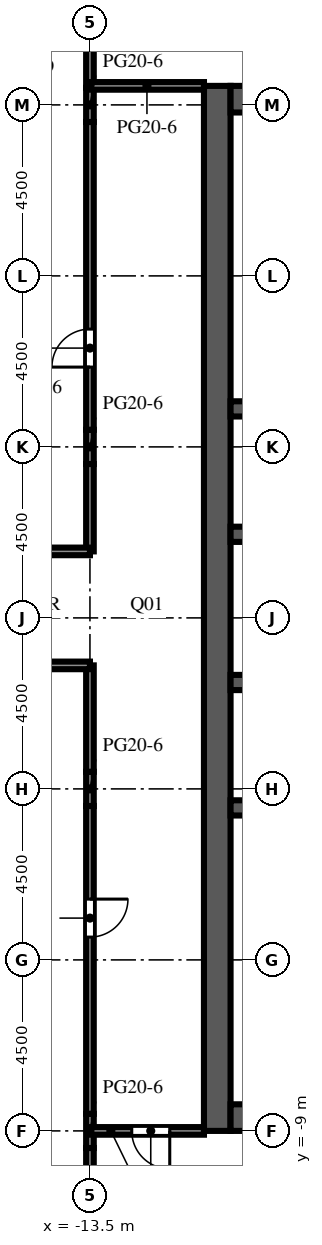
"""IFC4 building model, lengths in metres.
Left out: names, types, materials, properties, quantities, classifications, styles, units other than length and angle.
Written with IfcOpenShell. Run it as: python <this file> out.ifc"""

import sys

from ifc_helpers import new_model, si_unit, direction, frame, frame_2d, origin, place, context, subcontext, project, spatial, rectangle, extrude, element, fill, save


model = new_model("IFC4")
c1 = context("Model", 3, precision=1e-05, world=origin(), true_north=direction((0.0, 1.0)))
c2 = subcontext(c1, "Body", "Model", "MODEL_VIEW")
j1 = project(units=[si_unit("LENGTHUNIT", "METRE"), si_unit("PLANEANGLEUNIT", "RADIAN")], contexts=[c1])
p1 = place(None, origin())
s1 = spatial("IfcSite", under=j1, at=p1, CompositionType="ELEMENT")
p2 = place(p1, origin())
s2 = spatial("IfcBuilding", under=s1, at=p2, CompositionType="ELEMENT")
p3 = place(p2, frame((0.0, 0.0, 260.3)))
s3 = spatial("IfcBuildingStorey", under=s2, at=p3, CompositionType="ELEMENT", Elevation=260.3)
p4 = place(p3, frame((-10.15, -9.0, 0.0), z_axis=(0.0, 0.0, 1.0), x_axis=(0.0, 1.0, 0.0)))
e1 = element("IfcWall", 1, at=p4, inside=s3, PredefinedType="SHEAR", context=c2, shape_type="SweptSolid", body=[
    extrude(rectangle(XDim=27.5, YDim=0.7, at=frame_2d((13.75, 0.0))), origin(), (0.0, 0.0, 1.0), 6.0),
])
p5 = place(p4, frame((12.55, 0.0, 0.0)))
e2 = element("IfcOpeningElement", 2, at=p5, cuts=e1, PredefinedType="OPENING", context=c2, shape_type="SweptSolid", body=[
    extrude(rectangle(XDim=2.4, YDim=2.4, at=frame_2d((1.2, 1.2))), frame((0.0, 0.36, 0.0), z_axis=(0.0, -1.0, 0.0), x_axis=(1.0, 0.0, 0.0)), (0.0, 0.0, 1.0), 0.72),
])
p6 = place(p4, frame((6.825, 0.0, 0.0)))
e3 = element("IfcOpeningElement", 3, at=p6, cuts=e1, PredefinedType="OPENING", context=c2, shape_type="SweptSolid", body=[
    extrude(rectangle(XDim=1.2, YDim=2.1, at=frame_2d((0.6, 1.05))), frame((0.0, 0.36, 0.0), z_axis=(0.0, -1.0, 0.0), x_axis=(1.0, 0.0, 0.0)), (0.0, 0.0, 1.0), 0.72),
])
p7 = place(p4, frame((19.475, 0.0, 0.0)))
e4 = element("IfcOpeningElement", 4, at=p7, cuts=e1, PredefinedType="OPENING", context=c2, shape_type="SweptSolid", body=[
    extrude(rectangle(XDim=1.2, YDim=2.1, at=frame_2d((0.6, 1.05))), frame((0.0, 0.36, 0.0), z_axis=(0.0, -1.0, 0.0), x_axis=(1.0, 0.0, 0.0)), (0.0, 0.0, 1.0), 0.72),
])
for number, where, z_axis, x_axis in (
    (5, (-9.8, -8.65, 0.0), (0.0, 0.0, 1.0), (1.0, 0.0, 0.0)),
    (6, (-9.8, 18.15, 0.0), (0.0, 0.0, 1.0), (1.0, 0.0, 0.0)),
):
    element("IfcWall", number, at=place(p3, frame(where, z_axis=z_axis, x_axis=x_axis)), inside=s3, PredefinedType="SHEAR", context=c2, shape_type="SweptSolid", body=[
        extrude(rectangle(XDim=10.6, YDim=0.7, at=frame_2d((5.3, 0.0))), origin(), (0.0, 0.0, 1.0), 6.0),
    ])
p8 = place(p3, frame((-9.8, -0.5, 0.0), z_axis=(0.0, 0.0, 1.0), x_axis=(1.0, 0.0, 0.0)))
e7 = element("IfcWall", 7, at=p8, inside=s3, PredefinedType="SHEAR", context=c2, shape_type="SweptSolid", body=[
    extrude(rectangle(XDim=10.6, YDim=0.4, at=frame_2d((5.3, 0.0))), origin(), (0.0, 0.0, 1.0), 6.0),
])
p9 = place(p3, frame((-9.8, 2.8, 0.0), z_axis=(0.0, 0.0, 1.0), x_axis=(1.0, 0.0, 0.0)))
e8 = element("IfcWall", 8, at=p9, inside=s3, PredefinedType="SHEAR", context=c2, shape_type="SweptSolid", body=[
    extrude(rectangle(XDim=10.6, YDim=0.4, at=frame_2d((5.3, 0.0))), origin(), (0.0, 0.0, 1.0), 6.0),
])
p10 = place(p9, frame((0.688, 0.0, 0.0)))
e9 = element("IfcOpeningElement", 9, at=p10, cuts=e8, PredefinedType="OPENING", context=c2, shape_type="SweptSolid", body=[
    extrude(rectangle(XDim=1.1, YDim=2.1, at=frame_2d((0.55, 1.05))), frame((0.0, 0.21, 0.0), z_axis=(0.0, -1.0, 0.0), x_axis=(1.0, 0.0, 0.0)), (0.0, 0.0, 1.0), 0.42),
])
p11 = place(p9, frame((3.438, 0.0, 0.0)))
e10 = element("IfcOpeningElement", 10, at=p11, cuts=e8, PredefinedType="OPENING", context=c2, shape_type="SweptSolid", body=[
    extrude(rectangle(XDim=1.1, YDim=2.1, at=frame_2d((0.55, 1.05))), frame((0.0, 0.21, 0.0), z_axis=(0.0, -1.0, 0.0), x_axis=(1.0, 0.0, 0.0)), (0.0, 0.0, 1.0), 0.42),
])
p12 = place(p9, frame((6.113, 0.0, 0.0)))
e11 = element("IfcOpeningElement", 11, at=p12, cuts=e8, PredefinedType="OPENING", context=c2, shape_type="SweptSolid", body=[
    extrude(rectangle(XDim=1.0, YDim=2.1, at=frame_2d((0.5, 1.05))), frame((0.0, 0.21, 0.0), z_axis=(0.0, -1.0, 0.0), x_axis=(1.0, 0.0, 0.0)), (0.0, 0.0, 1.0), 0.42),
])
p13 = place(p9, frame((8.863, 0.0, 0.0)))
e12 = element("IfcOpeningElement", 12, at=p13, cuts=e8, PredefinedType="OPENING", context=c2, shape_type="SweptSolid", body=[
    extrude(rectangle(XDim=1.0, YDim=2.1, at=frame_2d((0.5, 1.05))), frame((0.0, 0.21, 0.0), z_axis=(0.0, -1.0, 0.0), x_axis=(1.0, 0.0, 0.0)), (0.0, 0.0, 1.0), 0.42),
])
p14 = place(p3, frame((-9.8, 6.7, 0.0), z_axis=(0.0, 0.0, 1.0), x_axis=(1.0, 0.0, 0.0)))
e13 = element("IfcWall", 13, at=p14, inside=s3, PredefinedType="SHEAR", context=c2, shape_type="SweptSolid", body=[
    extrude(rectangle(XDim=10.6, YDim=0.4, at=frame_2d((5.3, 0.0))), origin(), (0.0, 0.0, 1.0), 6.0),
])
p15 = place(p14, frame((3.438, 0.0, 0.0)))
e14 = element("IfcOpeningElement", 14, at=p15, cuts=e13, PredefinedType="OPENING", context=c2, shape_type="SweptSolid", body=[
    extrude(rectangle(XDim=1.1, YDim=2.1, at=frame_2d((0.55, 1.05))), frame((0.0, 0.21, 0.0), z_axis=(0.0, -1.0, 0.0), x_axis=(1.0, 0.0, 0.0)), (0.0, 0.0, 1.0), 0.42),
])
p16 = place(p14, frame((6.062, 0.0, 0.0)))
e15 = element("IfcOpeningElement", 15, at=p16, cuts=e13, PredefinedType="OPENING", context=c2, shape_type="SweptSolid", body=[
    extrude(rectangle(XDim=1.1, YDim=2.1, at=frame_2d((0.55, 1.05))), frame((0.0, 0.21, 0.0), z_axis=(0.0, -1.0, 0.0), x_axis=(1.0, 0.0, 0.0)), (0.0, 0.0, 1.0), 0.42),
])
p17 = place(p14, frame((8.812, 0.0, 0.0)))
e16 = element("IfcOpeningElement", 16, at=p17, cuts=e13, PredefinedType="OPENING", context=c2, shape_type="SweptSolid", body=[
    extrude(rectangle(XDim=1.1, YDim=2.1, at=frame_2d((0.55, 1.05))), frame((0.0, 0.21, 0.0), z_axis=(0.0, -1.0, 0.0), x_axis=(1.0, 0.0, 0.0)), (0.0, 0.0, 1.0), 0.42),
])
p18 = place(p14, frame((0.738, 0.0, 0.0)))
e17 = element("IfcOpeningElement", 17, at=p18, cuts=e13, PredefinedType="OPENING", context=c2, shape_type="SweptSolid", body=[
    extrude(rectangle(XDim=1.0, YDim=2.1, at=frame_2d((0.5, 1.05))), frame((0.0, 0.21, 0.0), z_axis=(0.0, -1.0, 0.0), x_axis=(1.0, 0.0, 0.0)), (0.0, 0.0, 1.0), 0.42),
])
p19 = place(p3, frame((-9.8, 10.0, 0.0), z_axis=(0.0, 0.0, 1.0), x_axis=(1.0, 0.0, 0.0)))
e18 = element("IfcWall", 18, at=p19, inside=s3, PredefinedType="SHEAR", context=c2, shape_type="SweptSolid", body=[
    extrude(rectangle(XDim=10.6, YDim=0.4, at=frame_2d((5.3, 0.0))), origin(), (0.0, 0.0, 1.0), 6.0),
])
p20 = place(p3, frame((-13.5, -17.55, 0.0), z_axis=(0.0, 0.0, 1.0), x_axis=(0.0, 1.0, 0.0)))
e19 = element("IfcWall", 19, at=p20, inside=s3, PredefinedType="PARTITIONING", context=c2, shape_type="SweptSolid", body=[
    extrude(rectangle(XDim=8.1, YDim=0.2, at=frame_2d((4.05, 0.0))), origin(), (0.0, 0.0, 1.0), 5.55),
])
p21 = place(p3, frame((-13.5, -9.45, 0.0), z_axis=(0.0, 0.0, 1.0), x_axis=(0.0, 1.0, 0.0)))
e20 = element("IfcWall", 20, at=p21, inside=s3, PredefinedType="PARTITIONING", context=c2, shape_type="SweptSolid", body=[
    extrude(rectangle(XDim=0.9, YDim=0.2, at=frame_2d((0.45, 0.0))), origin(), (0.0, 0.0, 1.0), 3.72),
])
p22 = place(p3, frame((-13.5, -8.55, 0.0), z_axis=(0.0, 0.0, 1.0), x_axis=(0.0, 1.0, 0.0)))
e21 = element("IfcWall", 21, at=p22, inside=s3, PredefinedType="PARTITIONING", context=c2, shape_type="SweptSolid", body=[
    extrude(rectangle(XDim=8.1, YDim=0.2, at=frame_2d((4.05, 0.0))), origin(), (0.0, 0.0, 1.0), 5.55),
])
p23 = place(p22, frame((4.65, 0.0, 0.0)))
e22 = element("IfcOpeningElement", 22, at=p23, cuts=e21, PredefinedType="OPENING", context=c2, shape_type="SweptSolid", body=[
    extrude(rectangle(XDim=1.0, YDim=2.1, at=frame_2d((0.5, 1.05))), frame((0.0, 0.11, 0.0), z_axis=(0.0, -1.0, 0.0), x_axis=(1.0, 0.0, 0.0)), (0.0, 0.0, 1.0), 0.22),
])
p24 = place(p3, frame((-13.5, -0.45, 0.0), z_axis=(0.0, 0.0, 1.0), x_axis=(0.0, 1.0, 0.0)))
e23 = element("IfcWall", 23, at=p24, inside=s3, PredefinedType="PARTITIONING", context=c2, shape_type="SweptSolid", body=[
    extrude(rectangle(XDim=0.9, YDim=0.2, at=frame_2d((0.45, 0.0))), origin(), (0.0, 0.0, 1.0), 3.72),
])
p25 = place(p3, frame((-13.5, 0.45, 0.0), z_axis=(0.0, 0.0, 1.0), x_axis=(0.0, 1.0, 0.0)))
e24 = element("IfcWall", 24, at=p25, inside=s3, PredefinedType="PARTITIONING", context=c2, shape_type="SweptSolid", body=[
    extrude(rectangle(XDim=2.8, YDim=0.2, at=frame_2d((1.4, 0.0))), origin(), (0.0, 0.0, 1.0), 5.55),
])
p26 = place(p3, frame((-13.5, 6.25, 0.0), z_axis=(0.0, 0.0, 1.0), x_axis=(0.0, 1.0, 0.0)))
e25 = element("IfcWall", 25, at=p26, inside=s3, PredefinedType="PARTITIONING", context=c2, shape_type="SweptSolid", body=[
    extrude(rectangle(XDim=2.3, YDim=0.2, at=frame_2d((1.15, 0.0))), origin(), (0.0, 0.0, 1.0), 5.55),
])
p27 = place(p3, frame((-13.5, 8.55, 0.0), z_axis=(0.0, 0.0, 1.0), x_axis=(0.0, 1.0, 0.0)))
e26 = element("IfcWall", 26, at=p27, inside=s3, PredefinedType="PARTITIONING", context=c2, shape_type="SweptSolid", body=[
    extrude(rectangle(XDim=0.9, YDim=0.2, at=frame_2d((0.45, 0.0))), origin(), (0.0, 0.0, 1.0), 3.72),
])
p28 = place(p3, frame((-13.5, 9.45, 0.0), z_axis=(0.0, 0.0, 1.0), x_axis=(0.0, 1.0, 0.0)))
e27 = element("IfcWall", 27, at=p28, inside=s3, PredefinedType="PARTITIONING", context=c2, shape_type="SweptSolid", body=[
    extrude(rectangle(XDim=8.1, YDim=0.2, at=frame_2d((4.05, 0.0))), origin(), (0.0, 0.0, 1.0), 5.55),
])
p29 = place(p28, frame((1.65, 0.0, 0.0)))
e28 = element("IfcOpeningElement", 28, at=p29, cuts=e27, PredefinedType="OPENING", context=c2, shape_type="SweptSolid", body=[
    extrude(rectangle(XDim=1.0, YDim=2.1, at=frame_2d((0.5, 1.05))), frame((0.0, 0.11, 0.0), z_axis=(0.0, -1.0, 0.0), x_axis=(1.0, 0.0, 0.0)), (0.0, 0.0, 1.0), 0.22),
])
p30 = place(p3, frame((-13.5, 17.55, 0.0), z_axis=(0.0, 0.0, 1.0), x_axis=(0.0, 1.0, 0.0)))
e29 = element("IfcWall", 29, at=p30, inside=s3, PredefinedType="PARTITIONING", context=c2, shape_type="SweptSolid", body=[
    extrude(rectangle(XDim=0.9, YDim=0.2, at=frame_2d((0.45, 0.0))), origin(), (0.0, 0.0, 1.0), 3.72),
])
p31 = place(p3, frame((-13.5, 18.45, 0.0), z_axis=(0.0, 0.0, 1.0), x_axis=(0.0, 1.0, 0.0)))
e30 = element("IfcWall", 30, at=p31, inside=s3, PredefinedType="PARTITIONING", context=c2, shape_type="SweptSolid", body=[
    extrude(rectangle(XDim=8.1, YDim=0.2, at=frame_2d((4.05, 0.0))), origin(), (0.0, 0.0, 1.0), 5.55),
])
p32 = place(p3, frame((-10.5, -9.0, 0.0), z_axis=(0.0, 0.0, 1.0), x_axis=(-1.0, 0.0, 0.0)))
e31 = element("IfcWall", 31, at=p32, inside=s3, PredefinedType="PARTITIONING", context=c2, shape_type="SweptSolid", body=[
    extrude(rectangle(XDim=3.0, YDim=0.2, at=frame_2d((1.5, 0.0))), origin(), (0.0, 0.0, 1.0), 3.72),
])
p33 = place(p32, frame((0.9, 0.0, 0.0)))
e32 = element("IfcOpeningElement", 32, at=p33, cuts=e31, PredefinedType="OPENING", context=c2, shape_type="SweptSolid", body=[
    extrude(rectangle(XDim=1.0, YDim=2.1, at=frame_2d((0.5, 1.05))), frame((0.0, 0.11, 0.0), z_axis=(0.0, -1.0, 0.0), x_axis=(1.0, 0.0, 0.0)), (0.0, 0.0, 1.0), 0.22),
])
for number, where, z_axis, x_axis in (
    (33, (-17.9, 3.25, 0.0), (0.0, 0.0, 1.0), (1.0, 0.0, 0.0)),
    (34, (-17.9, 6.25, 0.0), (0.0, 0.0, 1.0), (1.0, 0.0, 0.0)),
):
    element("IfcWall", number, at=place(p3, frame(where, z_axis=z_axis, x_axis=x_axis)), inside=s3, PredefinedType="PARTITIONING", context=c2, shape_type="SweptSolid", body=[
        extrude(rectangle(XDim=4.4, YDim=0.2, at=frame_2d((2.2, 0.0))), origin(), (0.0, 0.0, 1.0), 5.55),
    ])
p34 = place(p3, frame((-13.5, 18.5, 0.0), z_axis=(0.0, 0.0, 1.0), x_axis=(1.0, 0.0, 0.0)))
e35 = element("IfcWall", 35, at=p34, inside=s3, PredefinedType="PARTITIONING", context=c2, shape_type="SweptSolid", body=[
    extrude(rectangle(XDim=3.0, YDim=0.2, at=frame_2d((1.5, 0.0))), origin(), (0.0, 0.0, 1.0), 3.72),
])
p35 = place(p5, origin())
e36 = element("IfcDoor", 36, at=p35, inside=s3, OperationType="DOUBLE_DOOR_DOUBLE_SWING", PredefinedType="DOOR", context=c2, shape_type="SweptSolid", body=[
    extrude(rectangle(XDim=2.4, YDim=2.4, at=frame_2d((1.2, 1.2))), frame((0.0, 0.025, 0.0), z_axis=(0.0, -1.0, 0.0), x_axis=(1.0, 0.0, 0.0)), (0.0, 0.0, 1.0), 0.05),
])
fill(e2, e36)
p36 = place(p6, origin())
e37 = element("IfcDoor", 37, at=p36, inside=s3, OperationType="SINGLE_SWING_LEFT", PredefinedType="DOOR", context=c2, shape_type="SweptSolid", body=[
    extrude(rectangle(XDim=1.2, YDim=2.1, at=frame_2d((0.6, 1.05))), frame((0.0, 0.025, 0.0), z_axis=(0.0, -1.0, 0.0), x_axis=(1.0, 0.0, 0.0)), (0.0, 0.0, 1.0), 0.05),
])
fill(e3, e37)
p37 = place(p7, origin())
e38 = element("IfcDoor", 38, at=p37, inside=s3, OperationType="SINGLE_SWING_LEFT", PredefinedType="DOOR", context=c2, shape_type="SweptSolid", body=[
    extrude(rectangle(XDim=1.2, YDim=2.1, at=frame_2d((0.6, 1.05))), frame((0.0, 0.025, 0.0), z_axis=(0.0, -1.0, 0.0), x_axis=(1.0, 0.0, 0.0)), (0.0, 0.0, 1.0), 0.05),
])
fill(e4, e38)
p38 = place(p23, origin())
e39 = element("IfcDoor", 39, at=p38, inside=s3, OperationType="SINGLE_SWING_RIGHT", PredefinedType="DOOR", context=c2, shape_type="SweptSolid", body=[
    extrude(rectangle(XDim=1.0, YDim=2.1, at=frame_2d((0.5, 1.05))), frame((0.0, 0.025, 0.0), z_axis=(0.0, -1.0, 0.0), x_axis=(1.0, 0.0, 0.0)), (0.0, 0.0, 1.0), 0.05),
])
fill(e22, e39)
p39 = place(p29, origin())
e40 = element("IfcDoor", 40, at=p39, inside=s3, OperationType="SINGLE_SWING_LEFT", PredefinedType="DOOR", context=c2, shape_type="SweptSolid", body=[
    extrude(rectangle(XDim=1.0, YDim=2.1, at=frame_2d((0.5, 1.05))), frame((0.0, 0.025, 0.0), z_axis=(0.0, -1.0, 0.0), x_axis=(1.0, 0.0, 0.0)), (0.0, 0.0, 1.0), 0.05),
])
fill(e28, e40)
p40 = place(p33, origin())
e41 = element("IfcDoor", 41, at=p40, inside=s3, OperationType="SINGLE_SWING_LEFT", PredefinedType="DOOR", context=c2, shape_type="SweptSolid", body=[
    extrude(rectangle(XDim=1.0, YDim=2.1, at=frame_2d((0.5, 1.05))), frame((0.0, 0.025, 0.0), z_axis=(0.0, -1.0, 0.0), x_axis=(1.0, 0.0, 0.0)), (0.0, 0.0, 1.0), 0.05),
])
fill(e32, e41)
save(model, sys.argv[1])
